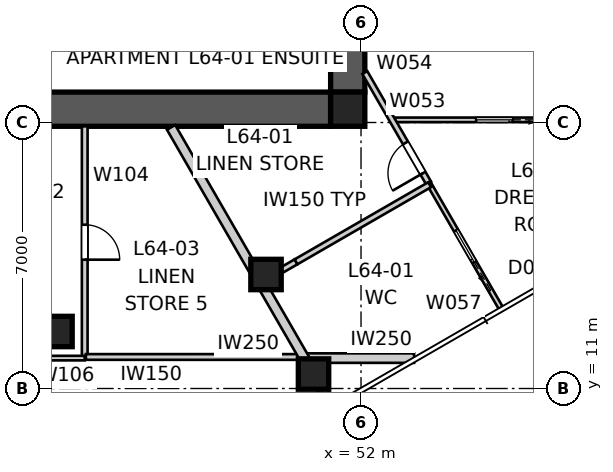
"""IFC4 building model, lengths in metres.
Left out: names, types, materials, properties, quantities, classifications, styles, units other than length and angle.
Written with IfcOpenShell. Run it as: python <this file> out.ifc"""

import sys

from ifc_helpers import new_model, si_unit, direction, frame, frame_2d, origin, origin_2d, place, context, subcontext, project, spatial, polyline, rectangle, outline, extrude, element, fill, save


model = new_model("IFC4")
c1 = context("Model", 3, precision=1e-05, world=origin(), true_north=direction((0.0, 1.0)))
c2 = subcontext(c1, "Body", "Model", "MODEL_VIEW")
j1 = project(units=[si_unit("LENGTHUNIT", "METRE"), si_unit("PLANEANGLEUNIT", "RADIAN")], contexts=[c1])
p1 = place(None, origin())
s1 = spatial("IfcSite", under=j1, at=p1, CompositionType="ELEMENT")
p2 = place(p1, origin())
s2 = spatial("IfcBuilding", under=s1, at=p2, CompositionType="ELEMENT")
p3 = place(p2, frame((0.0, 0.0, 232.0)))
s3 = spatial("IfcBuildingStorey", under=s2, at=p3, CompositionType="ELEMENT", Elevation=232.0)
p4 = place(p3, frame((51.2, 18.35, 0.0), z_axis=(0.0, 0.0, 1.0), x_axis=(-1.0, 0.0, 0.0)))
e1 = element("IfcWall", 1, at=p4, inside=s3, PredefinedType="SHEAR", context=c2, shape_type="SweptSolid", body=[
    extrude(outline(polyline([(0.0, -0.45), (22.4, -0.45), (22.4, -0.025), (22.85, -0.025), (22.85, 0.025), (22.4, 0.025), (22.4, 0.45), (0.0, 0.45), (0.0, 0.025), (-0.45, 0.025), (-0.45, -0.025), (0.0, -0.025), (0.0, -0.45)])), origin(), (0.0, 0.0, 1.0), 3.4),
])
p5 = place(p3, frame((51.65, 18.8, 0.0), z_axis=(0.0, 0.0, 1.0), x_axis=(0.0, 1.0, 0.0)))
e2 = element("IfcWall", 2, at=p5, inside=s3, PredefinedType="SHEAR", context=c2, shape_type="SweptSolid", body=[
    extrude(outline(polyline([(0.0, -0.45), (22.4, -0.45), (22.4, -0.025), (22.85, -0.025), (22.85, 0.025), (22.4, 0.025), (22.4, 0.45), (0.0, 0.45), (0.0, 0.025), (-0.45, 0.025), (-0.45, -0.025), (0.0, -0.025), (0.0, -0.45)])), origin(), (0.0, 0.0, 1.0), 3.4),
])
p6 = place(p5, frame((11.14, 0.0, 0.0)))
e3 = element("IfcOpeningElement", 3, at=p6, cuts=e2, PredefinedType="OPENING", context=c2, shape_type="SweptSolid", body=[
    extrude(rectangle(XDim=1.02, YDim=2.4, at=frame_2d((0.51, 1.2))), frame((0.0, 0.46, 0.0), z_axis=(0.0, -1.0, 0.0), x_axis=(1.0, 0.0, 0.0)), (0.0, 0.0, 1.0), 0.92),
])
p7 = place(p3, frame((51.65, 18.35, 0.0), z_axis=(0.0, 0.0, 1.0), x_axis=(1.0, 0.0, 0.0)))
e4 = element("IfcColumn", 4, at=p7, inside=s3, PredefinedType="COLUMN", context=c2, shape_type="SweptSolid", body=[
    extrude(rectangle(XDim=0.9, YDim=0.9, at=origin_2d()), origin(), (0.0, 0.0, 1.0), 3.4),
])
p8 = place(p3, frame((50.75, 11.38, 0.0), z_axis=(0.0, 0.0, 1.0), x_axis=(1.0, 0.0, 0.0)))
e5 = element("IfcColumn", 5, at=p8, inside=s3, PredefinedType="COLUMN", context=c2, shape_type="SweptSolid", body=[
    extrude(rectangle(XDim=0.8, YDim=0.8, at=origin_2d()), origin(), (0.0, 0.0, 1.0), 3.2),
])
for number, where, z_axis, x_axis in (
    (6, (44.0, 12.5, 0.0), (0.0, 0.0, 1.0), (1.0, 0.0, 0.0)),
    (7, (49.5, 14.0, 0.0), (0.0, 0.0, 1.0), (1.0, 0.0, 0.0)),
):
    element("IfcColumn", number, at=place(p3, frame(where, z_axis=z_axis, x_axis=x_axis)), inside=s3, PredefinedType="COLUMN", context=c2, shape_type="SweptSolid", body=[
        extrude(rectangle(XDim=0.8, YDim=0.8, at=origin_2d()), origin(), (0.0, 0.0, 1.0), 3.4),
    ])
p9 = place(p3, frame((51.25, 10.514, 0.0), z_axis=(0.0, 0.0, 1.0), x_axis=(-0.500008511703, 0.866020489494, 0.0)))
e8 = element("IfcWall", 8, at=p9, inside=s3, PredefinedType="PARTITIONING", context=c2, shape_type="SweptSolid", body=[
    extrude(rectangle(XDim=8.496, YDim=0.25, at=frame_2d((4.248, 0.0))), origin(), (0.0, 0.0, 1.0), 3.2),
])
p10 = place(p3, frame((58.2, 18.07, 0.0), z_axis=(0.0, 0.0, 1.0), x_axis=(-1.0, 0.0, 0.0)))
e9 = element("IfcWall", 9, at=p10, inside=s3, PredefinedType="PARTITIONING", context=c2, shape_type="SweptSolid", body=[
    extrude(rectangle(XDim=5.381, YDim=0.12, at=frame_2d((2.691, 0.0))), origin(), (0.0, 0.0, 1.0), 3.2),
])
p11 = place(p10, frame((2.211, 0.0, 0.0)))
e10 = element("IfcOpeningElement", 10, at=p11, cuts=e9, PredefinedType="OPENING", context=c2, shape_type="SweptSolid", body=[
    extrude(rectangle(XDim=0.96, YDim=2.1, at=frame_2d((0.48, 1.05))), frame((0.0, 0.07, 0.0), z_axis=(0.0, -1.0, 0.0), x_axis=(1.0, 0.0, 0.0)), (0.0, 0.0, 1.0), 0.14),
])
p12 = place(p3, frame((53.779, 16.406, 0.0), z_axis=(0.0, 0.0, 1.0), x_axis=(-0.499969954228, 0.866042750024, 0.0)))
e11 = element("IfcWall", 11, at=p12, inside=s3, PredefinedType="SOLIDWALL", context=c2, shape_type="SweptSolid", body=[
    extrude(rectangle(XDim=3.359, YDim=0.15, at=frame_2d((1.679, 0.0))), origin(), (0.0, 0.0, 1.0), 3.2),
])
p13 = place(p12, frame((0.301, 0.0, 0.0)))
e12 = element("IfcOpeningElement", 12, at=p13, cuts=e11, PredefinedType="OPENING", context=c2, shape_type="SweptSolid", body=[
    extrude(rectangle(XDim=0.92, YDim=2.0, at=frame_2d((0.46, 1.0))), frame((0.0, 0.085, 0.0), z_axis=(0.0, -1.0, 0.0), x_axis=(1.0, 0.0, 0.0)), (0.0, 0.0, 1.0), 0.17),
])
p14 = place(p3, frame((55.678, 13.117, 0.0), z_axis=(0.0, 0.0, 1.0), x_axis=(-0.500024807712, 0.866011080572, 0.0)))
e13 = element("IfcWall", 13, at=p14, inside=s3, PredefinedType="PARTITIONING", context=c2, shape_type="SweptSolid", body=[
    extrude(rectangle(XDim=3.798, YDim=0.12, at=frame_2d((1.899, 0.0))), origin(), (0.0, 0.0, 1.0), 3.2),
])
p15 = place(p14, frame((1.399, 0.0, 0.0)))
e14 = element("IfcOpeningElement", 14, at=p15, cuts=e13, PredefinedType="OPENING", context=c2, shape_type="SweptSolid", body=[
    extrude(rectangle(XDim=0.96, YDim=2.1, at=frame_2d((0.48, 1.05))), frame((0.0, 0.07, 0.0), z_axis=(0.0, -1.0, 0.0), x_axis=(1.0, 0.0, 0.0)), (0.0, 0.0, 1.0), 0.14),
])
p16 = place(p3, frame((49.356, 13.795, 0.0), z_axis=(0.0, 0.0, 1.0), x_axis=(0.866087482489, 0.499892461112, 0.0)))
e15 = element("IfcWall", 15, at=p16, inside=s3, PredefinedType="SOLIDWALL", context=c2, shape_type="SweptSolid", body=[
    extrude(rectangle(XDim=1.077, YDim=0.15, at=frame_2d((0.539, 0.0))), origin(), (0.0, 0.0, 1.0), 2.0),
])
p17 = place(p3, frame((50.289, 14.333, 0.0), z_axis=(0.0, 0.0, 1.0), x_axis=(0.866002269112, 0.500040068287, 0.0)))
e16 = element("IfcWall", 16, at=p17, inside=s3, PredefinedType="SOLIDWALL", context=c2, shape_type="SweptSolid", body=[
    extrude(rectangle(XDim=4.059, YDim=0.15, at=frame_2d((2.029, 0.0))), origin(), (0.0, 0.0, 1.0), 3.2),
])
p18 = place(p3, frame((53.397, 11.8, 0.0), z_axis=(0.0, 0.0, 1.0), x_axis=(-1.0, 0.0, 0.0)))
e17 = element("IfcWall", 17, at=p18, inside=s3, PredefinedType="PARTITIONING", context=c2, shape_type="SweptSolid", body=[
    extrude(rectangle(XDim=2.889, YDim=0.25, at=frame_2d((1.444, 0.0))), origin(), (0.0, 0.0, 1.0), 3.2),
])
p19 = place(p3, frame((44.729, 17.9, 0.0), z_axis=(0.0, 0.0, 1.0), x_axis=(0.0, -1.0, 0.0)))
e18 = element("IfcWall", 18, at=p19, inside=s3, PredefinedType="SOLIDWALL", context=c2, shape_type="SweptSolid", body=[
    extrude(rectangle(XDim=6.1, YDim=0.15, at=frame_2d((3.05, 0.0))), origin(), (0.0, 0.0, 1.0), 3.2),
])
p20 = place(p19, frame((2.59, 0.0, 0.0)))
e19 = element("IfcOpeningElement", 19, at=p20, cuts=e18, PredefinedType="OPENING", context=c2, shape_type="SweptSolid", body=[
    extrude(rectangle(XDim=0.92, YDim=2.34, at=frame_2d((0.46, 1.17))), frame((0.0, 0.085, 0.0), z_axis=(0.0, -1.0, 0.0), x_axis=(1.0, 0.0, 0.0)), (0.0, 0.0, 1.0), 0.17),
])
p21 = place(p3, frame((44.729, 11.8, 0.0), z_axis=(0.0, 0.0, 1.0), x_axis=(-1.0, 0.0, 0.0)))
e20 = element("IfcWall", 20, at=p21, inside=s3, PredefinedType="PARTITIONING", context=c2, shape_type="SweptSolid", body=[
    extrude(rectangle(XDim=4.144, YDim=0.12, at=frame_2d((2.072, 0.0))), origin(), (0.0, 0.0, 1.0), 3.2),
])
p22 = place(p21, frame((1.612, 0.0, 0.0)))
e21 = element("IfcOpeningElement", 21, at=p22, cuts=e20, PredefinedType="OPENING", context=c2, shape_type="SweptSolid", body=[
    extrude(rectangle(XDim=0.92, YDim=2.34, at=frame_2d((0.46, 1.17))), frame((0.0, 0.07, 0.0), z_axis=(0.0, -1.0, 0.0), x_axis=(1.0, 0.0, 0.0)), (0.0, 0.0, 1.0), 0.14),
])
p23 = place(p3, frame((50.491, 11.829, 0.0), z_axis=(0.0, 0.0, 1.0), x_axis=(-0.999999991834, 0.000127795526, 0.0)))
e22 = element("IfcWall", 22, at=p23, inside=s3, PredefinedType="SOLIDWALL", context=c2, shape_type="SweptSolid", body=[
    extrude(rectangle(XDim=5.731, YDim=0.15, at=frame_2d((2.866, 0.0))), origin(), (0.0, 0.0, 1.0), 3.2),
])
p24 = place(p11, origin())
e23 = element("IfcDoor", 23, at=p24, inside=s3, OperationType="SLIDING_TO_LEFT", PredefinedType="DOOR", context=c2, shape_type="SweptSolid", body=[
    extrude(rectangle(XDim=0.96, YDim=2.1, at=frame_2d((0.48, 1.05))), frame((0.0, 0.025, 0.0), z_axis=(0.0, -1.0, 0.0), x_axis=(1.0, 0.0, 0.0)), (0.0, 0.0, 1.0), 0.05),
])
fill(e10, e23)
p25 = place(p15, origin())
e24 = element("IfcDoor", 24, at=p25, inside=s3, OperationType="SLIDING_TO_LEFT", PredefinedType="DOOR", context=c2, shape_type="SweptSolid", body=[
    extrude(rectangle(XDim=0.96, YDim=2.1, at=frame_2d((0.48, 1.05))), frame((0.0, 0.025, 0.0), z_axis=(0.0, -1.0, 0.0), x_axis=(1.0, 0.0, 0.0)), (0.0, 0.0, 1.0), 0.05),
])
fill(e14, e24)
p26 = place(p13, origin())
e25 = element("IfcDoor", 25, at=p26, inside=s3, OperationType="SINGLE_SWING_LEFT", PredefinedType="DOOR", context=c2, shape_type="SweptSolid", body=[
    extrude(rectangle(XDim=0.92, YDim=2.0, at=frame_2d((0.46, 1.0))), frame((0.0, 0.025, 0.0), z_axis=(0.0, -1.0, 0.0), x_axis=(1.0, 0.0, 0.0)), (0.0, 0.0, 1.0), 0.05),
])
fill(e12, e25)
p27 = place(p20, origin())
e26 = element("IfcDoor", 26, at=p27, inside=s3, OperationType="SINGLE_SWING_RIGHT", PredefinedType="DOOR", context=c2, shape_type="SweptSolid", body=[
    extrude(rectangle(XDim=0.92, YDim=2.34, at=frame_2d((0.46, 1.17))), frame((0.0, 0.025, 0.0), z_axis=(0.0, -1.0, 0.0), x_axis=(1.0, 0.0, 0.0)), (0.0, 0.0, 1.0), 0.05),
])
fill(e19, e26)
save(model, sys.argv[1])
